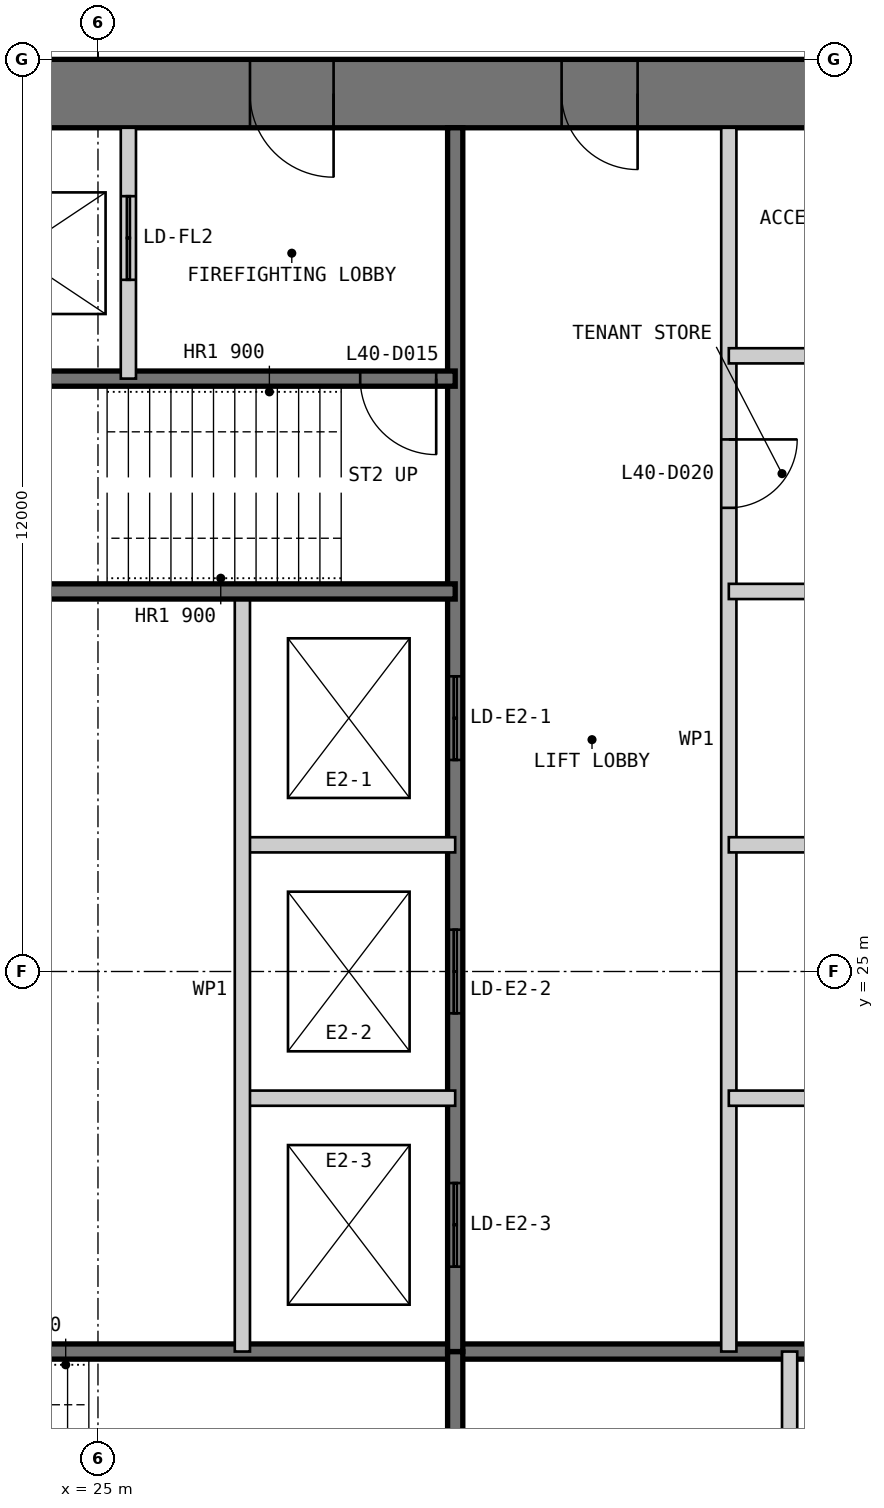
"""IFC4 building model, lengths in metres.
Left out: names, types, materials, properties, quantities, classifications, styles, units other than length and angle.
Written with IfcOpenShell. Run it as: python <this file> out.ifc"""

import sys

from ifc_helpers import new_model, si_unit, direction, frame, frame_2d, origin, place, context, subcontext, project, spatial, polyline, rectangle, outline, extrude, element, fill, save


model = new_model("IFC4")
c1 = context("Model", 3, precision=1e-05, world=origin(), true_north=direction((0.0, 1.0)))
c2 = subcontext(c1, "Body", "Model", "MODEL_VIEW")
j1 = project(units=[si_unit("LENGTHUNIT", "METRE"), si_unit("PLANEANGLEUNIT", "RADIAN")], contexts=[c1])
p1 = place(None, origin())
s1 = spatial("IfcSite", under=j1, at=p1, CompositionType="ELEMENT")
p2 = place(p1, origin())
s2 = spatial("IfcBuilding", under=s1, at=p2, CompositionType="ELEMENT")
p3 = place(p2, frame((0.0, 0.0, 173.8)))
s3 = spatial("IfcBuildingStorey", under=s2, at=p3, CompositionType="ELEMENT", Elevation=173.8)
p4 = place(p3, frame((37.0, 36.55, 0.0), z_axis=(0.0, 0.0, 1.0), x_axis=(-1.0, 0.0, 0.0)))
e1 = element("IfcWall", 1, at=p4, inside=s3, PredefinedType="SHEAR", context=c2, shape_type="SweptSolid", body=[
    extrude(outline(polyline([(0.0, -0.45), (24.0, -0.45), (23.1, 0.45), (0.9, 0.45), (0.0, -0.45)])), origin(), (0.0, 0.0, 1.0), 4.0),
])
p5 = place(p4, frame((4.9, 0.0, 0.0)))
e2 = element("IfcOpeningElement", 2, at=p5, cuts=e1, PredefinedType="OPENING", context=c2, shape_type="SweptSolid", body=[
    extrude(rectangle(XDim=1.0, YDim=2.2, at=frame_2d((0.5, 1.1))), frame((0.0, 0.46, 0.0), z_axis=(0.0, -1.0, 0.0), x_axis=(1.0, 0.0, 0.0)), (0.0, 0.0, 1.0), 0.92),
])
p6 = place(p4, frame((8.9, 0.0, 0.0)))
e3 = element("IfcOpeningElement", 3, at=p6, cuts=e1, PredefinedType="OPENING", context=c2, shape_type="SweptSolid", body=[
    extrude(rectangle(XDim=1.1, YDim=2.2, at=frame_2d((0.55, 1.1))), frame((0.0, 0.46, 0.0), z_axis=(0.0, -1.0, 0.0), x_axis=(1.0, 0.0, 0.0)), (0.0, 0.0, 1.0), 0.92),
])
p7 = place(p4, frame((15.05, 0.0, 0.0)))
e4 = element("IfcOpeningElement", 4, at=p7, cuts=e1, PredefinedType="OPENING", context=c2, shape_type="SweptSolid", body=[
    extrude(rectangle(XDim=0.9, YDim=2.2, at=frame_2d((0.45, 1.1))), frame((0.0, 0.46, 0.0), z_axis=(0.0, -1.0, 0.0), x_axis=(1.0, 0.0, 0.0)), (0.0, 0.0, 1.0), 0.92),
])
p8 = place(p4, frame((17.9, 0.0, 0.0)))
e5 = element("IfcOpeningElement", 5, at=p8, cuts=e1, PredefinedType="OPENING", context=c2, shape_type="SweptSolid", body=[
    extrude(rectangle(XDim=1.0, YDim=2.2, at=frame_2d((0.5, 1.1))), frame((0.0, 0.46, 0.0), z_axis=(0.0, -1.0, 0.0), x_axis=(1.0, 0.0, 0.0)), (0.0, 0.0, 1.0), 0.92),
])
p9 = place(p4, frame((21.4, 0.0, 0.0)))
e6 = element("IfcOpeningElement", 6, at=p9, cuts=e1, PredefinedType="OPENING", context=c2, shape_type="SweptSolid", body=[
    extrude(rectangle(XDim=1.0, YDim=2.2, at=frame_2d((0.5, 1.1))), frame((0.0, 0.46, 0.0), z_axis=(0.0, -1.0, 0.0), x_axis=(1.0, 0.0, 0.0)), (0.0, 0.0, 1.0), 0.92),
])
p10 = place(p3, frame((20.3, 20.0, 0.0), z_axis=(0.0, 0.0, 1.0), x_axis=(1.0, 0.0, 0.0)))
e7 = element("IfcWall", 7, at=p10, inside=s3, PredefinedType="SOLIDWALL", context=c2, shape_type="SweptSolid", body=[
    extrude(rectangle(XDim=15.8, YDim=0.2, at=frame_2d((7.9, 0.0))), origin(), (0.0, 0.0, 1.0), 3.8),
])
p11 = place(p3, frame((29.7, 13.9, 0.0), z_axis=(0.0, 0.0, 1.0), x_axis=(0.0, 1.0, 0.0)))
e8 = element("IfcWall", 8, at=p11, inside=s3, PredefinedType="SOLIDWALL", context=c2, shape_type="SweptSolid", body=[
    extrude(rectangle(XDim=6.1, YDim=0.2, at=frame_2d((3.05, 0.0))), origin(), (0.0, 0.0, 1.0), 3.8),
])
p12 = place(p3, frame((34.1, 13.9, 0.0), z_axis=(0.0, 0.0, 1.0), x_axis=(0.0, 1.0, 0.0)))
e9 = element("IfcWall", 9, at=p12, inside=s3, PredefinedType="PARTITIONING", context=c2, shape_type="SweptSolid", body=[
    extrude(rectangle(XDim=6.1, YDim=0.2, at=frame_2d((3.05, 0.0))), origin(), (0.0, 0.0, 1.0), 3.8),
])
p13 = place(p3, frame((33.3, 36.1, 0.0), z_axis=(0.0, 0.0, 1.0), x_axis=(0.0, -1.0, 0.0)))
e10 = element("IfcWall", 10, at=p13, inside=s3, PredefinedType="PARTITIONING", context=c2, shape_type="SweptSolid", body=[
    extrude(rectangle(XDim=16.1, YDim=0.2, at=frame_2d((8.05, 0.0))), origin(), (0.0, 0.0, 1.0), 3.8),
])
p14 = place(p13, frame((4.1, 0.0, 0.0)))
e11 = element("IfcOpeningElement", 11, at=p14, cuts=e10, PredefinedType="OPENING", context=c2, shape_type="SweptSolid", body=[
    extrude(rectangle(XDim=0.9, YDim=2.2, at=frame_2d((0.45, 1.1))), frame((0.0, 0.11, 0.0), z_axis=(0.0, -1.0, 0.0), x_axis=(1.0, 0.0, 0.0)), (0.0, 0.0, 1.0), 0.22),
])
p15 = place(p3, frame((29.7, 36.1, 0.0), z_axis=(0.0, 0.0, 1.0), x_axis=(0.0, -1.0, 0.0)))
e12 = element("IfcWall", 12, at=p15, inside=s3, PredefinedType="SOLIDWALL", context=c2, shape_type="SweptSolid", body=[
    extrude(rectangle(XDim=16.1, YDim=0.2, at=frame_2d((8.05, 0.0))), origin(), (0.0, 0.0, 1.0), 3.8),
])
p16 = place(p15, frame((7.217, 0.0, 0.0)))
e13 = element("IfcOpeningElement", 13, at=p16, cuts=e12, PredefinedType="OPENING", context=c2, shape_type="SweptSolid", body=[
    extrude(rectangle(XDim=1.1, YDim=2.2, at=frame_2d((0.55, 1.1))), frame((0.0, 0.11, 0.0), z_axis=(0.0, -1.0, 0.0), x_axis=(1.0, 0.0, 0.0)), (0.0, 0.0, 1.0), 0.22),
])
p17 = place(p15, frame((10.55, 0.0, 0.0)))
e14 = element("IfcOpeningElement", 14, at=p17, cuts=e12, PredefinedType="OPENING", context=c2, shape_type="SweptSolid", body=[
    extrude(rectangle(XDim=1.1, YDim=2.2, at=frame_2d((0.55, 1.1))), frame((0.0, 0.11, 0.0), z_axis=(0.0, -1.0, 0.0), x_axis=(1.0, 0.0, 0.0)), (0.0, 0.0, 1.0), 0.22),
])
p18 = place(p15, frame((13.883, 0.0, 0.0)))
e15 = element("IfcOpeningElement", 15, at=p18, cuts=e12, PredefinedType="OPENING", context=c2, shape_type="SweptSolid", body=[
    extrude(rectangle(XDim=1.1, YDim=2.2, at=frame_2d((0.55, 1.1))), frame((0.0, 0.11, 0.0), z_axis=(0.0, -1.0, 0.0), x_axis=(1.0, 0.0, 0.0)), (0.0, 0.0, 1.0), 0.22),
])
for number, where, z_axis, x_axis in (
    (16, (36.1, 30.0, 0.0), (0.0, 0.0, 1.0), (-1.0, 0.0, 0.0)),
    (17, (36.1, 26.667, 0.0), (0.0, 0.0, 1.0), (-1.0, 0.0, 0.0)),
    (18, (36.1, 23.333, 0.0), (0.0, 0.0, 1.0), (-1.0, 0.0, 0.0)),
    (19, (29.7, 26.667, 0.0), (0.0, 0.0, 1.0), (-1.0, 0.0, 0.0)),
    (20, (29.7, 23.333, 0.0), (0.0, 0.0, 1.0), (-1.0, 0.0, 0.0)),
):
    element("IfcWall", number, at=place(p3, frame(where, z_axis=z_axis, x_axis=x_axis)), inside=s3, PredefinedType="PARTITIONING", context=c2, shape_type="SweptSolid", body=[
        extrude(rectangle(XDim=2.8, YDim=0.2, at=frame_2d((1.4, 0.0))), origin(), (0.0, 0.0, 1.0), 3.8),
    ])
p19 = place(p3, frame((26.9, 30.0, 0.0), z_axis=(0.0, 0.0, 1.0), x_axis=(0.0, -1.0, 0.0)))
e21 = element("IfcWall", 21, at=p19, inside=s3, PredefinedType="PARTITIONING", context=c2, shape_type="SweptSolid", body=[
    extrude(rectangle(XDim=10.0, YDim=0.2, at=frame_2d((5.0, 0.0))), origin(), (0.0, 0.0, 1.0), 3.8),
])
p20 = place(p3, frame((29.7, 32.8, 0.0), z_axis=(0.0, 0.0, 1.0), x_axis=(-1.0, 0.0, 0.0)))
e22 = element("IfcWall", 22, at=p20, inside=s3, PredefinedType="SOLIDWALL", context=c2, shape_type="SweptSolid", body=[
    extrude(rectangle(XDim=9.4, YDim=0.2, at=frame_2d((4.7, 0.0))), origin(), (0.0, 0.0, 1.0), 3.8),
])
p21 = place(p20, frame((0.25, 0.0, 0.0)))
e23 = element("IfcOpeningElement", 23, at=p21, cuts=e22, PredefinedType="OPENING", context=c2, shape_type="SweptSolid", body=[
    extrude(rectangle(XDim=1.0, YDim=2.2, at=frame_2d((0.5, 1.1))), frame((0.0, 0.11, 0.0), z_axis=(0.0, -1.0, 0.0), x_axis=(1.0, 0.0, 0.0)), (0.0, 0.0, 1.0), 0.22),
])
p22 = place(p3, frame((29.7, 30.0, 0.0), z_axis=(0.0, 0.0, 1.0), x_axis=(-1.0, 0.0, 0.0)))
e24 = element("IfcWall", 24, at=p22, inside=s3, PredefinedType="SOLIDWALL", context=c2, shape_type="SweptSolid", body=[
    extrude(rectangle(XDim=15.8, YDim=0.2, at=frame_2d((7.9, 0.0))), origin(), (0.0, 0.0, 1.0), 3.8),
])
p23 = place(p3, frame((25.4, 36.1, 0.0), z_axis=(0.0, 0.0, 1.0), x_axis=(0.0, -1.0, 0.0)))
e25 = element("IfcWall", 25, at=p23, inside=s3, PredefinedType="PARTITIONING", context=c2, shape_type="SweptSolid", body=[
    extrude(rectangle(XDim=3.3, YDim=0.2, at=frame_2d((1.65, 0.0))), origin(), (0.0, 0.0, 1.0), 3.8),
])
p24 = place(p23, frame((0.9, 0.0, 0.0)))
e26 = element("IfcOpeningElement", 26, at=p24, cuts=e25, PredefinedType="OPENING", context=c2, shape_type="SweptSolid", body=[
    extrude(rectangle(XDim=1.1, YDim=2.2, at=frame_2d((0.55, 1.1))), frame((0.0, 0.11, 0.0), z_axis=(0.0, -1.0, 0.0), x_axis=(1.0, 0.0, 0.0)), (0.0, 0.0, 1.0), 0.22),
])
p25 = place(p3, frame((36.1, 33.1, 0.0), z_axis=(0.0, 0.0, 1.0), x_axis=(-1.0, 0.0, 0.0)))
e27 = element("IfcWall", 27, at=p25, inside=s3, PredefinedType="PARTITIONING", context=c2, shape_type="SweptSolid", body=[
    extrude(rectangle(XDim=2.8, YDim=0.2, at=frame_2d((1.4, 0.0))), origin(), (0.0, 0.0, 1.0), 3.8),
])
p26 = place(p5, origin())
e28 = element("IfcDoor", 28, at=p26, inside=s3, OperationType="SINGLE_SWING_LEFT", PredefinedType="DOOR", context=c2, shape_type="SweptSolid", body=[
    extrude(rectangle(XDim=1.0, YDim=2.2, at=frame_2d((0.5, 1.1))), frame((0.0, 0.025, 0.0), z_axis=(0.0, -1.0, 0.0), x_axis=(1.0, 0.0, 0.0)), (0.0, 0.0, 1.0), 0.05),
    extrude(outline(polyline([(0.0, 0.0), (0.04, 0.0), (0.04, 2.16), (0.96, 2.16), (0.96, 0.0), (1.0, 0.0), (1.0, 2.2), (0.0, 2.2), (0.0, 0.0)])), frame((0.0, 0.3, 0.0), z_axis=(0.0, -1.0, 0.0), x_axis=(1.0, 0.0, 0.0)), (0.0, 0.0, 1.0), 0.6),
])
fill(e2, e28)
p27 = place(p6, origin())
e29 = element("IfcDoor", 29, at=p27, inside=s3, OperationType="SINGLE_SWING_LEFT", PredefinedType="DOOR", context=c2, shape_type="SweptSolid", body=[
    extrude(rectangle(XDim=1.1, YDim=2.2, at=frame_2d((0.55, 1.1))), frame((0.0, 0.025, 0.0), z_axis=(0.0, -1.0, 0.0), x_axis=(1.0, 0.0, 0.0)), (0.0, 0.0, 1.0), 0.05),
    extrude(outline(polyline([(0.0, 0.0), (0.04, 0.0), (0.04, 2.16), (1.06, 2.16), (1.06, 0.0), (1.1, 0.0), (1.1, 2.2), (0.0, 2.2), (0.0, 0.0)])), frame((0.0, 0.3, 0.0), z_axis=(0.0, -1.0, 0.0), x_axis=(1.0, 0.0, 0.0)), (0.0, 0.0, 1.0), 0.6),
])
fill(e3, e29)
p28 = place(p21, origin())
e30 = element("IfcDoor", 30, at=p28, inside=s3, OperationType="SINGLE_SWING_LEFT", PredefinedType="DOOR", context=c2, shape_type="SweptSolid", body=[
    extrude(rectangle(XDim=1.0, YDim=2.2, at=frame_2d((0.5, 1.1))), frame((0.0, 0.025, 0.0), z_axis=(0.0, -1.0, 0.0), x_axis=(1.0, 0.0, 0.0)), (0.0, 0.0, 1.0), 0.05),
])
fill(e23, e30)
p29 = place(p14, origin())
e31 = element("IfcDoor", 31, at=p29, inside=s3, OperationType="SINGLE_SWING_LEFT", PredefinedType="DOOR", context=c2, shape_type="SweptSolid", body=[
    extrude(rectangle(XDim=0.9, YDim=2.2, at=frame_2d((0.45, 1.1))), frame((0.0, 0.025, 0.0), z_axis=(0.0, -1.0, 0.0), x_axis=(1.0, 0.0, 0.0)), (0.0, 0.0, 1.0), 0.05),
])
fill(e11, e31)
p30 = place(p24, origin())
e32 = element("IfcDoor", 32, at=p30, inside=s3, OperationType="DOUBLE_DOOR_SLIDING", PredefinedType="DOOR", context=c2, shape_type="SweptSolid", body=[
    extrude(rectangle(XDim=1.1, YDim=2.2, at=frame_2d((0.55, 1.1))), frame((0.0, 0.025, 0.0), z_axis=(0.0, -1.0, 0.0), x_axis=(1.0, 0.0, 0.0)), (0.0, 0.0, 1.0), 0.05),
])
fill(e26, e32)
p31 = place(p16, origin())
e33 = element("IfcDoor", 33, at=p31, inside=s3, OperationType="DOUBLE_DOOR_SLIDING", PredefinedType="DOOR", context=c2, shape_type="SweptSolid", body=[
    extrude(rectangle(XDim=1.1, YDim=2.2, at=frame_2d((0.55, 1.1))), frame((0.0, 0.025, 0.0), z_axis=(0.0, -1.0, 0.0), x_axis=(1.0, 0.0, 0.0)), (0.0, 0.0, 1.0), 0.05),
])
fill(e13, e33)
p32 = place(p17, origin())
e34 = element("IfcDoor", 34, at=p32, inside=s3, OperationType="DOUBLE_DOOR_SLIDING", PredefinedType="DOOR", context=c2, shape_type="SweptSolid", body=[
    extrude(rectangle(XDim=1.1, YDim=2.2, at=frame_2d((0.55, 1.1))), frame((0.0, 0.025, 0.0), z_axis=(0.0, -1.0, 0.0), x_axis=(1.0, 0.0, 0.0)), (0.0, 0.0, 1.0), 0.05),
])
fill(e14, e34)
p33 = place(p18, origin())
e35 = element("IfcDoor", 35, at=p33, inside=s3, OperationType="DOUBLE_DOOR_SLIDING", PredefinedType="DOOR", context=c2, shape_type="SweptSolid", body=[
    extrude(rectangle(XDim=1.1, YDim=2.2, at=frame_2d((0.55, 1.1))), frame((0.0, 0.025, 0.0), z_axis=(0.0, -1.0, 0.0), x_axis=(1.0, 0.0, 0.0)), (0.0, 0.0, 1.0), 0.05),
])
fill(e15, e35)
save(model, sys.argv[1])
